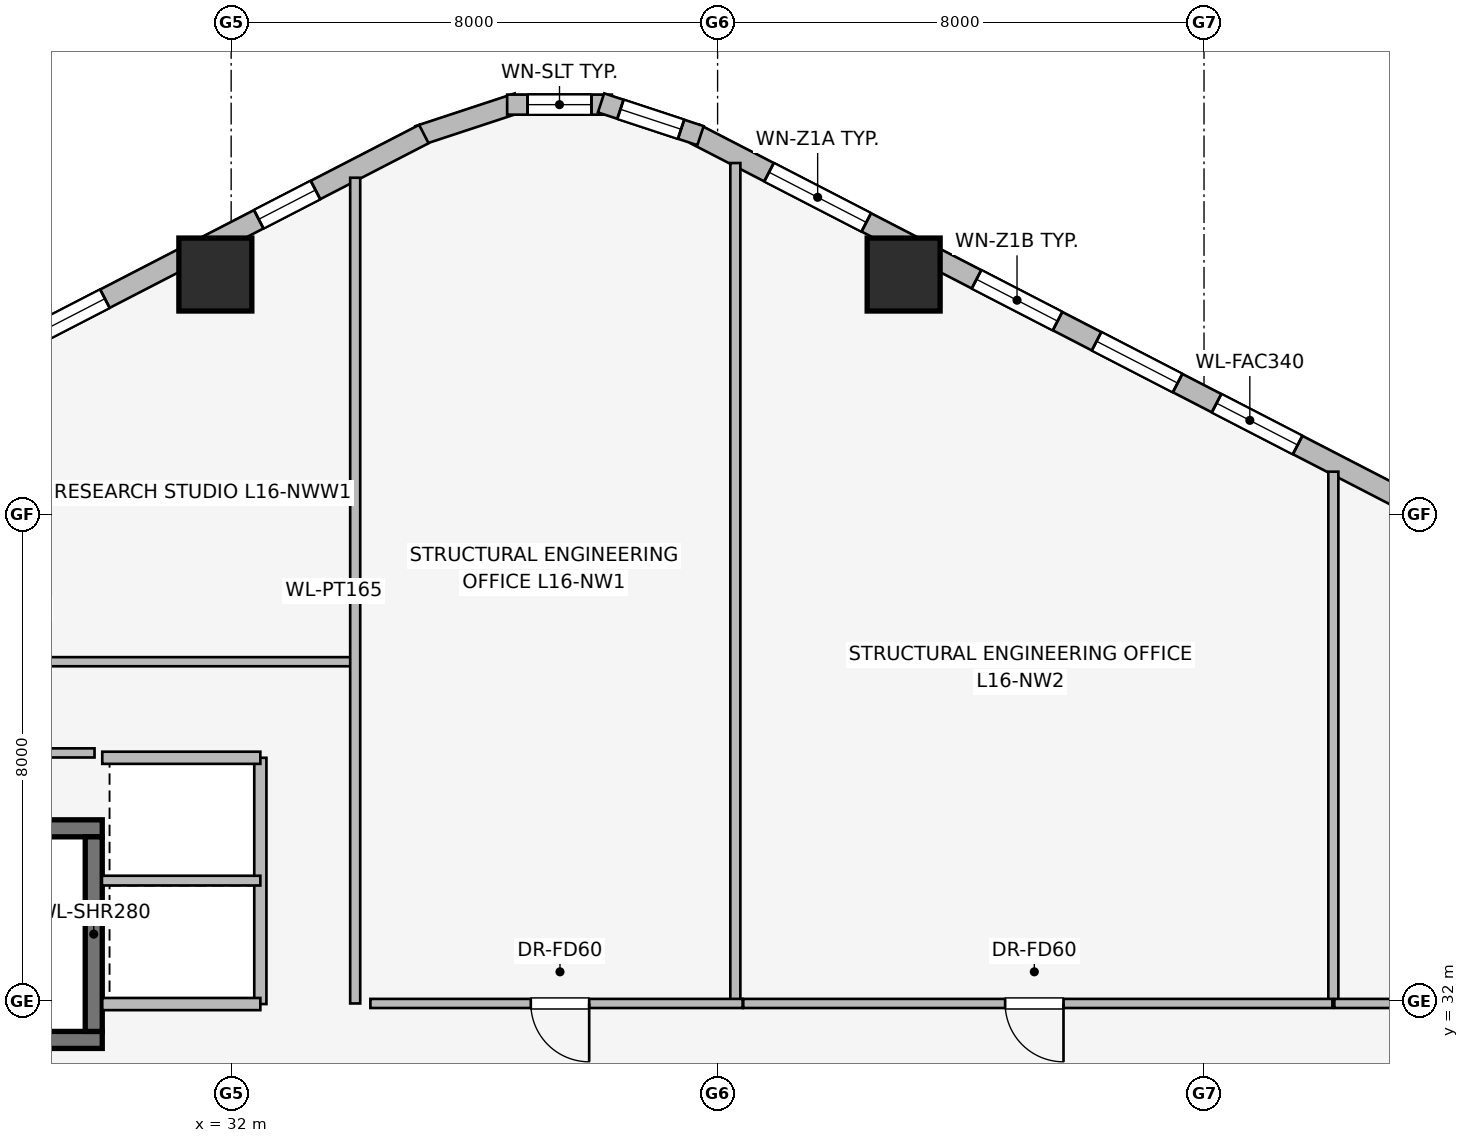
"""IFC4 building model, lengths in metres.
Left out: names, types, materials, properties, quantities, classifications, styles, units other than length and angle.
Written with IfcOpenShell. Run it as: python <this file> out.ifc"""

import sys

from ifc_helpers import new_model, si_unit, direction, frame, frame_2d, origin, origin_2d, place, context, subcontext, project, spatial, rectangle, extrude, element, fill, save


model = new_model("IFC4")
c1 = context("Model", 3, precision=1e-05, world=origin(), true_north=direction((0.0, 1.0)))
c2 = subcontext(c1, "Body", "Model", "MODEL_VIEW")
j1 = project(units=[si_unit("LENGTHUNIT", "METRE"), si_unit("PLANEANGLEUNIT", "RADIAN")], contexts=[c1])
p1 = place(None, origin())
s1 = spatial("IfcSite", under=j1, at=p1, CompositionType="ELEMENT")
p2 = place(p1, origin())
s2 = spatial("IfcBuilding", under=s1, at=p2, CompositionType="ELEMENT")
p3 = place(p2, frame((0.0, 0.0, 63.5)))
s3 = spatial("IfcBuildingStorey", under=s2, at=p3, CompositionType="ELEMENT", Elevation=63.5)
p4 = place(p3, frame((21.52, 31.36, 0.0), z_axis=(0.0, 0.0, 1.0), x_axis=(1.0, 0.0, 0.0)))
e1 = element("IfcWall", 1, at=p4, inside=s3, PredefinedType="SHEAR", context=c2, shape_type="SweptSolid", body=[
    extrude(rectangle(XDim=8.36, YDim=0.28, at=frame_2d((4.18, 0.0))), origin(), (0.0, 0.0, 1.0), 3.65),
])
p5 = place(p4, frame((0.45, 0.0, 0.0)))
e2 = element("IfcOpeningElement", 2, at=p5, cuts=e1, PredefinedType="OPENING", context=c2, shape_type="SweptSolid", body=[
    extrude(rectangle(XDim=1.05, YDim=2.0, at=frame_2d((0.525, 1.0))), frame((0.0, 0.15, 0.0), z_axis=(0.0, -1.0, 0.0), x_axis=(1.0, 0.0, 0.0)), (0.0, 0.0, 1.0), 0.3),
])
p6 = place(p3, frame((29.88, 34.84, 0.0), z_axis=(0.0, 0.0, 1.0), x_axis=(-1.0, 0.0, 0.0)))
e3 = element("IfcWall", 3, at=p6, inside=s3, PredefinedType="SHEAR", context=c2, shape_type="SweptSolid", body=[
    extrude(rectangle(XDim=8.36, YDim=0.28, at=frame_2d((4.18, 0.0))), origin(), (0.0, 0.0, 1.0), 3.65),
])
p7 = place(p3, frame((29.74, 31.5, 0.0), z_axis=(0.0, 0.0, 1.0), x_axis=(0.0, 1.0, 0.0)))
e4 = element("IfcWall", 4, at=p7, inside=s3, PredefinedType="SHEAR", context=c2, shape_type="SweptSolid", body=[
    extrude(rectangle(XDim=3.2, YDim=0.28, at=frame_2d((1.6, 0.0))), origin(), (0.0, 0.0, 1.0), 3.65),
])
for number, where, z_axis, x_axis in (
    (5, (43.06, 43.947, 0.0), (0.0, 0.0, 1.0), (1.0, 0.0, 0.0)),
    (6, (31.74, 43.947, 0.0), (0.0, 0.0, 1.0), (1.0, 0.0, 0.0)),
):
    element("IfcColumn", number, at=place(p3, frame(where, z_axis=z_axis, x_axis=x_axis)), inside=s3, PredefinedType="COLUMN", context=c2, shape_type="SweptSolid", body=[
        extrude(rectangle(XDim=1.2, YDim=1.2, at=origin_2d()), origin(), (0.0, 0.0, 1.0), 3.65),
    ])
p8 = place(p3, frame((39.631, 46.257, 0.0), z_axis=(0.0, 0.0, 1.0), x_axis=(0.888634413993, -0.458616264721, 0.0)))
e7 = element("IfcWall", 7, at=p8, inside=s3, PredefinedType="STANDARD", context=c2, shape_type="SweptSolid", body=[
    extrude(rectangle(XDim=20.531, YDim=0.34, at=frame_2d((10.266, 0.0))), origin(), (0.0, 0.0, 1.0), 2.684),
])
p9 = place(p8, frame((1.367, 0.0, 0.75)))
e8 = element("IfcOpeningElement", 8, at=p9, cuts=e7, PredefinedType="OPENING", context=c2, shape_type="SweptSolid", body=[
    extrude(rectangle(XDim=1.8, YDim=1.5, at=frame_2d((0.9, 0.75))), frame((0.0, 0.18, 0.0), z_axis=(0.0, -1.0, 0.0), x_axis=(1.0, 0.0, 0.0)), (0.0, 0.0, 1.0), 0.36),
])
p10 = place(p8, frame((5.207, 0.0, 0.75)))
e9 = element("IfcOpeningElement", 9, at=p10, cuts=e7, PredefinedType="OPENING", context=c2, shape_type="SweptSolid", body=[
    extrude(rectangle(XDim=1.5, YDim=1.5, at=frame_2d((0.75, 0.75))), frame((0.0, 0.18, 0.0), z_axis=(0.0, -1.0, 0.0), x_axis=(1.0, 0.0, 0.0)), (0.0, 0.0, 1.0), 0.36),
])
p11 = place(p8, frame((7.429, 0.0, 0.75)))
e10 = element("IfcOpeningElement", 10, at=p11, cuts=e7, PredefinedType="OPENING", context=c2, shape_type="SweptSolid", body=[
    extrude(rectangle(XDim=1.5, YDim=1.5, at=frame_2d((0.75, 0.75))), frame((0.0, 0.18, 0.0), z_axis=(0.0, -1.0, 0.0), x_axis=(1.0, 0.0, 0.0)), (0.0, 0.0, 1.0), 0.36),
])
p12 = place(p8, frame((9.65, 0.0, 0.75)))
e11 = element("IfcOpeningElement", 11, at=p12, cuts=e7, PredefinedType="OPENING", context=c2, shape_type="SweptSolid", body=[
    extrude(rectangle(XDim=1.5, YDim=1.5, at=frame_2d((0.75, 0.75))), frame((0.0, 0.18, 0.0), z_axis=(0.0, -1.0, 0.0), x_axis=(1.0, 0.0, 0.0)), (0.0, 0.0, 1.0), 0.36),
])
p13 = place(p8, frame((13.06, 0.0, 0.75)))
e12 = element("IfcOpeningElement", 12, at=p13, cuts=e7, PredefinedType="OPENING", context=c2, shape_type="SweptSolid", body=[
    extrude(rectangle(XDim=1.8, YDim=1.5, at=frame_2d((0.9, 0.75))), frame((0.0, 0.18, 0.0), z_axis=(0.0, -1.0, 0.0), x_axis=(1.0, 0.0, 0.0)), (0.0, 0.0, 1.0), 0.36),
])
p14 = place(p8, frame((17.98, 0.0, 0.75)))
e13 = element("IfcOpeningElement", 13, at=p14, cuts=e7, PredefinedType="OPENING", context=c2, shape_type="SweptSolid", body=[
    extrude(rectangle(XDim=1.5, YDim=1.5, at=frame_2d((0.75, 0.75))), frame((0.0, 0.18, 0.0), z_axis=(0.0, -1.0, 0.0), x_axis=(1.0, 0.0, 0.0)), (0.0, 0.0, 1.0), 0.36),
])
p15 = place(p3, frame((35.081, 46.231, 0.0), z_axis=(0.0, 0.0, 1.0), x_axis=(0.94976901097, 0.312951794691, 0.0)))
e14 = element("IfcWall", 14, at=p15, inside=s3, PredefinedType="STANDARD", context=c2, shape_type="SweptSolid", body=[
    extrude(rectangle(XDim=1.722, YDim=0.33, at=frame_2d((0.861, 0.0))), origin(), (0.0, 0.0, 1.0), 3.39),
])
p16 = place(p3, frame((36.539, 46.741, 0.0), z_axis=(0.0, 0.0, 1.0), x_axis=(1.0, 0.0, 0.0)))
e15 = element("IfcWall", 15, at=p16, inside=s3, PredefinedType="STANDARD", context=c2, shape_type="SweptSolid", body=[
    extrude(rectangle(XDim=1.722, YDim=0.33, at=frame_2d((0.861, 0.0))), origin(), (0.0, 0.0, 1.0), 3.39),
])
p17 = place(p16, frame((0.336, 0.0, 0.75)))
e16 = element("IfcOpeningElement", 16, at=p17, cuts=e15, PredefinedType="OPENING", context=c2, shape_type="SweptSolid", body=[
    extrude(rectangle(XDim=1.05, YDim=1.4, at=frame_2d((0.525, 0.7))), frame((0.0, 0.175, 0.0), z_axis=(0.0, -1.0, 0.0), x_axis=(1.0, 0.0, 0.0)), (0.0, 0.0, 1.0), 0.35),
])
p18 = place(p3, frame((38.083, 46.77, 0.0), z_axis=(0.0, 0.0, 1.0), x_axis=(0.94976901097, -0.312951794691, 0.0)))
e17 = element("IfcWall", 17, at=p18, inside=s3, PredefinedType="STANDARD", context=c2, shape_type="SweptSolid", body=[
    extrude(rectangle(XDim=1.722, YDim=0.33, at=frame_2d((0.861, 0.0))), origin(), (0.0, 0.0, 1.0), 3.39),
])
p19 = place(p18, frame((0.336, 0.0, 0.75)))
e18 = element("IfcOpeningElement", 18, at=p19, cuts=e17, PredefinedType="OPENING", context=c2, shape_type="SweptSolid", body=[
    extrude(rectangle(XDim=1.05, YDim=1.4, at=frame_2d((0.525, 0.7))), frame((0.0, 0.175, 0.0), z_axis=(0.0, -1.0, 0.0), x_axis=(1.0, 0.0, 0.0)), (0.0, 0.0, 1.0), 0.35),
])
p20 = place(p3, frame((16.924, 36.841, 0.0), z_axis=(0.0, 0.0, 1.0), x_axis=(0.888634413993, 0.458616264721, 0.0)))
e19 = element("IfcWall", 19, at=p20, inside=s3, PredefinedType="STANDARD", context=c2, shape_type="SweptSolid", body=[
    extrude(rectangle(XDim=20.531, YDim=0.34, at=frame_2d((10.266, 0.0))), origin(), (0.0, 0.0, 1.0), 2.684),
])
p21 = place(p20, frame((2.161, 0.0, 0.75)))
e20 = element("IfcOpeningElement", 20, at=p21, cuts=e19, PredefinedType="OPENING", context=c2, shape_type="SweptSolid", body=[
    extrude(rectangle(XDim=1.05, YDim=1.4, at=frame_2d((0.525, 0.7))), frame((0.0, 0.18, 0.0), z_axis=(0.0, -1.0, 0.0), x_axis=(1.0, 0.0, 0.0)), (0.0, 0.0, 1.0), 0.36),
])
p22 = place(p20, frame((5.903, 0.0, 0.75)))
e21 = element("IfcOpeningElement", 21, at=p22, cuts=e19, PredefinedType="OPENING", context=c2, shape_type="SweptSolid", body=[
    extrude(rectangle(XDim=1.5, YDim=1.5, at=frame_2d((0.75, 0.75))), frame((0.0, 0.18, 0.0), z_axis=(0.0, -1.0, 0.0), x_axis=(1.0, 0.0, 0.0)), (0.0, 0.0, 1.0), 0.36),
])
p23 = place(p20, frame((9.516, 0.0, 0.75)))
e22 = element("IfcOpeningElement", 22, at=p23, cuts=e19, PredefinedType="OPENING", context=c2, shape_type="SweptSolid", body=[
    extrude(rectangle(XDim=1.5, YDim=1.5, at=frame_2d((0.75, 0.75))), frame((0.0, 0.18, 0.0), z_axis=(0.0, -1.0, 0.0), x_axis=(1.0, 0.0, 0.0)), (0.0, 0.0, 1.0), 0.36),
])
p24 = place(p20, frame((13.129, 0.0, 0.75)))
e23 = element("IfcOpeningElement", 23, at=p24, cuts=e19, PredefinedType="OPENING", context=c2, shape_type="SweptSolid", body=[
    extrude(rectangle(XDim=1.5, YDim=1.5, at=frame_2d((0.75, 0.75))), frame((0.0, 0.18, 0.0), z_axis=(0.0, -1.0, 0.0), x_axis=(1.0, 0.0, 0.0)), (0.0, 0.0, 1.0), 0.36),
])
p25 = place(p20, frame((17.476, 0.0, 0.75)))
e24 = element("IfcOpeningElement", 24, at=p25, cuts=e19, PredefinedType="OPENING", context=c2, shape_type="SweptSolid", body=[
    extrude(rectangle(XDim=1.05, YDim=1.4, at=frame_2d((0.525, 0.7))), frame((0.0, 0.18, 0.0), z_axis=(0.0, -1.0, 0.0), x_axis=(1.0, 0.0, 0.0)), (0.0, 0.0, 1.0), 0.36),
])
p26 = place(p3, frame((32.48, 31.95, 0.0), z_axis=(0.0, 0.0, 1.0), x_axis=(0.0, 1.0, 0.0)))
e25 = element("IfcWall", 25, at=p26, inside=s3, PredefinedType="PARTITIONING", context=c2, shape_type="SweptSolid", body=[
    extrude(rectangle(XDim=4.05, YDim=0.2, at=frame_2d((2.025, 0.0))), origin(), (0.0, 0.0, 1.0), 2.513),
])
for number, where, z_axis, x_axis in (
    (26, (29.88, 36.0, 0.0), (0.0, 0.0, 1.0), (1.0, 0.0, 0.0)),
    (27, (32.48, 31.95, 0.0), (0.0, 0.0, 1.0), (-1.0, 0.0, 0.0)),
):
    element("IfcWall", number, at=place(p3, frame(where, z_axis=z_axis, x_axis=x_axis)), inside=s3, PredefinedType="PARTITIONING", context=c2, shape_type="SweptSolid", body=[
        extrude(rectangle(XDim=2.6, YDim=0.2, at=frame_2d((1.3, 0.0))), origin(), (0.0, 0.0, 1.0), 3.39),
    ])
p27 = place(p3, frame((29.875, 33.98, 0.0), z_axis=(0.0, 0.0, 1.0), x_axis=(1.0, 0.0, 0.0)))
e28 = element("IfcWall", 28, at=p27, inside=s3, PredefinedType="PARTITIONING", context=c2, shape_type="SweptSolid", body=[
    extrude(rectangle(XDim=2.605, YDim=0.16, at=frame_2d((1.302, 0.0))), origin(), (0.0, 0.0, 1.0), 3.39),
])
p28 = place(p3, frame((34.0, 37.58, 0.0), z_axis=(0.0, 0.0, 1.0), x_axis=(-1.0, 0.0, 0.0)))
e29 = element("IfcWall", 29, at=p28, inside=s3, PredefinedType="PARTITIONING", context=c2, shape_type="SweptSolid", body=[
    extrude(rectangle(XDim=15.6, YDim=0.15, at=frame_2d((7.8, 0.0))), origin(), (0.0, 0.0, 1.0), 3.39),
])
p29 = place(p28, frame((5.195, 0.0, 0.0)))
e30 = element("IfcOpeningElement", 30, at=p29, cuts=e29, PredefinedType="OPENING", context=c2, shape_type="SweptSolid", body=[
    extrude(rectangle(XDim=0.96, YDim=2.0, at=frame_2d((0.48, 1.0))), frame((0.0, 0.085, 0.0), z_axis=(0.0, -1.0, 0.0), x_axis=(1.0, 0.0, 0.0)), (0.0, 0.0, 1.0), 0.17),
])
p30 = place(p3, frame((34.04, 31.96, 0.0), z_axis=(0.0, 0.0, 1.0), x_axis=(0.0, 1.0, 0.0)))
e31 = element("IfcWall", 31, at=p30, inside=s3, PredefinedType="PARTITIONING", context=c2, shape_type="SweptSolid", body=[
    extrude(rectangle(XDim=13.579, YDim=0.165, at=frame_2d((6.79, 0.0))), origin(), (0.0, 0.0, 1.0), 3.39),
])
p31 = place(p3, frame((40.292, 31.97, 0.0), z_axis=(0.0, 0.0, 1.0), x_axis=(0.0, 1.0, 0.0)))
e32 = element("IfcWall", 32, at=p31, inside=s3, PredefinedType="PARTITIONING", context=c2, shape_type="SweptSolid", body=[
    extrude(rectangle(XDim=13.811, YDim=0.165, at=frame_2d((6.906, 0.0))), origin(), (0.0, 0.0, 1.0), 2.513),
])
p32 = place(p3, frame((50.127, 31.97, 0.0), z_axis=(0.0, 0.0, 1.0), x_axis=(0.0, 1.0, 0.0)))
e33 = element("IfcWall", 33, at=p32, inside=s3, PredefinedType="PARTITIONING", context=c2, shape_type="SweptSolid", body=[
    extrude(rectangle(XDim=8.735, YDim=0.165, at=frame_2d((4.368, 0.0))), origin(), (0.0, 0.0, 1.0), 3.39),
])
p33 = place(p3, frame((40.412, 31.96, 0.0), z_axis=(0.0, 0.0, 1.0), x_axis=(-1.0, 0.0, 0.0)))
e34 = element("IfcWall", 34, at=p33, inside=s3, PredefinedType="PARTITIONING", context=c2, shape_type="SweptSolid", body=[
    extrude(rectangle(XDim=6.122, YDim=0.15, at=frame_2d((3.061, 0.0))), origin(), (0.0, 0.0, 1.0), 3.39),
])
p34 = place(p33, frame((2.524, 0.0, 0.0)))
e35 = element("IfcOpeningElement", 35, at=p34, cuts=e34, PredefinedType="OPENING", context=c2, shape_type="SweptSolid", body=[
    extrude(rectangle(XDim=0.96, YDim=2.0, at=frame_2d((0.48, 1.0))), frame((0.0, 0.085, 0.0), z_axis=(0.0, -1.0, 0.0), x_axis=(1.0, 0.0, 0.0)), (0.0, 0.0, 1.0), 0.17),
])
p35 = place(p3, frame((50.111, 31.96, 0.0), z_axis=(0.0, 0.0, 1.0), x_axis=(-1.0, 0.0, 0.0)))
e36 = element("IfcWall", 36, at=p35, inside=s3, PredefinedType="PARTITIONING", context=c2, shape_type="SweptSolid", body=[
    extrude(rectangle(XDim=9.689, YDim=0.15, at=frame_2d((4.844, 0.0))), origin(), (0.0, 0.0, 1.0), 3.39),
])
p36 = place(p35, frame((4.422, 0.0, 0.0)))
e37 = element("IfcOpeningElement", 37, at=p36, cuts=e36, PredefinedType="OPENING", context=c2, shape_type="SweptSolid", body=[
    extrude(rectangle(XDim=0.96, YDim=2.0, at=frame_2d((0.48, 1.0))), frame((0.0, 0.085, 0.0), z_axis=(0.0, -1.0, 0.0), x_axis=(1.0, 0.0, 0.0)), (0.0, 0.0, 1.0), 0.17),
])
p37 = place(p3, frame((54.656, 31.96, 0.0), z_axis=(0.0, 0.0, 1.0), x_axis=(-1.0, 0.0, 0.0)))
e38 = element("IfcWall", 38, at=p37, inside=s3, PredefinedType="PARTITIONING", context=c2, shape_type="SweptSolid", body=[
    extrude(rectangle(XDim=4.513, YDim=0.15, at=frame_2d((2.256, 0.0))), origin(), (0.0, 0.0, 1.0), 3.39),
])
p38 = place(p37, frame((1.72, 0.0, 0.0)))
e39 = element("IfcOpeningElement", 39, at=p38, cuts=e38, PredefinedType="OPENING", context=c2, shape_type="SweptSolid", body=[
    extrude(rectangle(XDim=0.96, YDim=2.0, at=frame_2d((0.48, 1.0))), frame((0.0, 0.085, 0.0), z_axis=(0.0, -1.0, 0.0), x_axis=(1.0, 0.0, 0.0)), (0.0, 0.0, 1.0), 0.17),
])
p39 = place(p3, frame((29.753, 36.08, 0.0), z_axis=(0.0, 0.0, 1.0), x_axis=(-1.0, 0.0, 0.0)))
e40 = element("IfcWall", 40, at=p39, inside=s3, PredefinedType="PARTITIONING", context=c2, shape_type="SweptSolid", body=[
    extrude(rectangle(XDim=7.353, YDim=0.15, at=frame_2d((3.677, 0.0))), origin(), (0.0, 0.0, 1.0), 3.39),
])
p40 = place(p9, origin())
e41 = element("IfcWindow", 41, at=p40, inside=s3, PartitioningType="SINGLE_PANEL", PredefinedType="WINDOW", context=c2, shape_type="SweptSolid", body=[
    extrude(rectangle(XDim=1.8, YDim=1.5, at=frame_2d((0.9, 0.75))), frame((0.0, 0.03, 0.0), z_axis=(0.0, -1.0, 0.0), x_axis=(1.0, 0.0, 0.0)), (0.0, 0.0, 1.0), 0.06),
])
fill(e8, e41)
p41 = place(p10, origin())
e42 = element("IfcWindow", 42, at=p41, inside=s3, PartitioningType="SINGLE_PANEL", PredefinedType="WINDOW", context=c2, shape_type="SweptSolid", body=[
    extrude(rectangle(XDim=1.5, YDim=1.5, at=frame_2d((0.75, 0.75))), frame((0.0, 0.03, 0.0), z_axis=(0.0, -1.0, 0.0), x_axis=(1.0, 0.0, 0.0)), (0.0, 0.0, 1.0), 0.06),
])
fill(e9, e42)
p42 = place(p11, origin())
e43 = element("IfcWindow", 43, at=p42, inside=s3, PartitioningType="SINGLE_PANEL", PredefinedType="WINDOW", context=c2, shape_type="SweptSolid", body=[
    extrude(rectangle(XDim=1.5, YDim=1.5, at=frame_2d((0.75, 0.75))), frame((0.0, 0.03, 0.0), z_axis=(0.0, -1.0, 0.0), x_axis=(1.0, 0.0, 0.0)), (0.0, 0.0, 1.0), 0.06),
])
fill(e10, e43)
p43 = place(p12, origin())
e44 = element("IfcWindow", 44, at=p43, inside=s3, PartitioningType="SINGLE_PANEL", PredefinedType="WINDOW", context=c2, shape_type="SweptSolid", body=[
    extrude(rectangle(XDim=1.5, YDim=1.5, at=frame_2d((0.75, 0.75))), frame((0.0, 0.03, 0.0), z_axis=(0.0, -1.0, 0.0), x_axis=(1.0, 0.0, 0.0)), (0.0, 0.0, 1.0), 0.06),
])
fill(e11, e44)
p44 = place(p17, origin())
e45 = element("IfcWindow", 45, at=p44, inside=s3, PartitioningType="SINGLE_PANEL", PredefinedType="WINDOW", context=c2, shape_type="SweptSolid", body=[
    extrude(rectangle(XDim=1.05, YDim=1.4, at=frame_2d((0.525, 0.7))), frame((0.0, 0.03, 0.0), z_axis=(0.0, -1.0, 0.0), x_axis=(1.0, 0.0, 0.0)), (0.0, 0.0, 1.0), 0.06),
])
fill(e16, e45)
p45 = place(p19, origin())
e46 = element("IfcWindow", 46, at=p45, inside=s3, PartitioningType="SINGLE_PANEL", PredefinedType="WINDOW", context=c2, shape_type="SweptSolid", body=[
    extrude(rectangle(XDim=1.05, YDim=1.4, at=frame_2d((0.525, 0.7))), frame((0.0, 0.03, 0.0), z_axis=(0.0, -1.0, 0.0), x_axis=(1.0, 0.0, 0.0)), (0.0, 0.0, 1.0), 0.06),
])
fill(e18, e46)
p46 = place(p24, origin())
e47 = element("IfcWindow", 47, at=p46, inside=s3, PartitioningType="SINGLE_PANEL", PredefinedType="WINDOW", context=c2, shape_type="SweptSolid", body=[
    extrude(rectangle(XDim=1.5, YDim=1.5, at=frame_2d((0.75, 0.75))), frame((0.0, 0.03, 0.0), z_axis=(0.0, -1.0, 0.0), x_axis=(1.0, 0.0, 0.0)), (0.0, 0.0, 1.0), 0.06),
])
fill(e23, e47)
p47 = place(p25, origin())
e48 = element("IfcWindow", 48, at=p47, inside=s3, PartitioningType="SINGLE_PANEL", PredefinedType="WINDOW", context=c2, shape_type="SweptSolid", body=[
    extrude(rectangle(XDim=1.05, YDim=1.4, at=frame_2d((0.525, 0.7))), frame((0.0, 0.03, 0.0), z_axis=(0.0, -1.0, 0.0), x_axis=(1.0, 0.0, 0.0)), (0.0, 0.0, 1.0), 0.06),
])
fill(e24, e48)
p48 = place(p34, origin())
e49 = element("IfcDoor", 49, at=p48, inside=s3, OperationType="SINGLE_SWING_LEFT", PredefinedType="DOOR", context=c2, shape_type="SweptSolid", body=[
    extrude(rectangle(XDim=0.96, YDim=2.0, at=frame_2d((0.48, 1.0))), frame((0.0, 0.025, 0.0), z_axis=(0.0, -1.0, 0.0), x_axis=(1.0, 0.0, 0.0)), (0.0, 0.0, 1.0), 0.05),
])
fill(e35, e49)
p49 = place(p36, origin())
e50 = element("IfcDoor", 50, at=p49, inside=s3, OperationType="SINGLE_SWING_LEFT", PredefinedType="DOOR", context=c2, shape_type="SweptSolid", body=[
    extrude(rectangle(XDim=0.96, YDim=2.0, at=frame_2d((0.48, 1.0))), frame((0.0, 0.025, 0.0), z_axis=(0.0, -1.0, 0.0), x_axis=(1.0, 0.0, 0.0)), (0.0, 0.0, 1.0), 0.05),
])
fill(e37, e50)
save(model, sys.argv[1])
